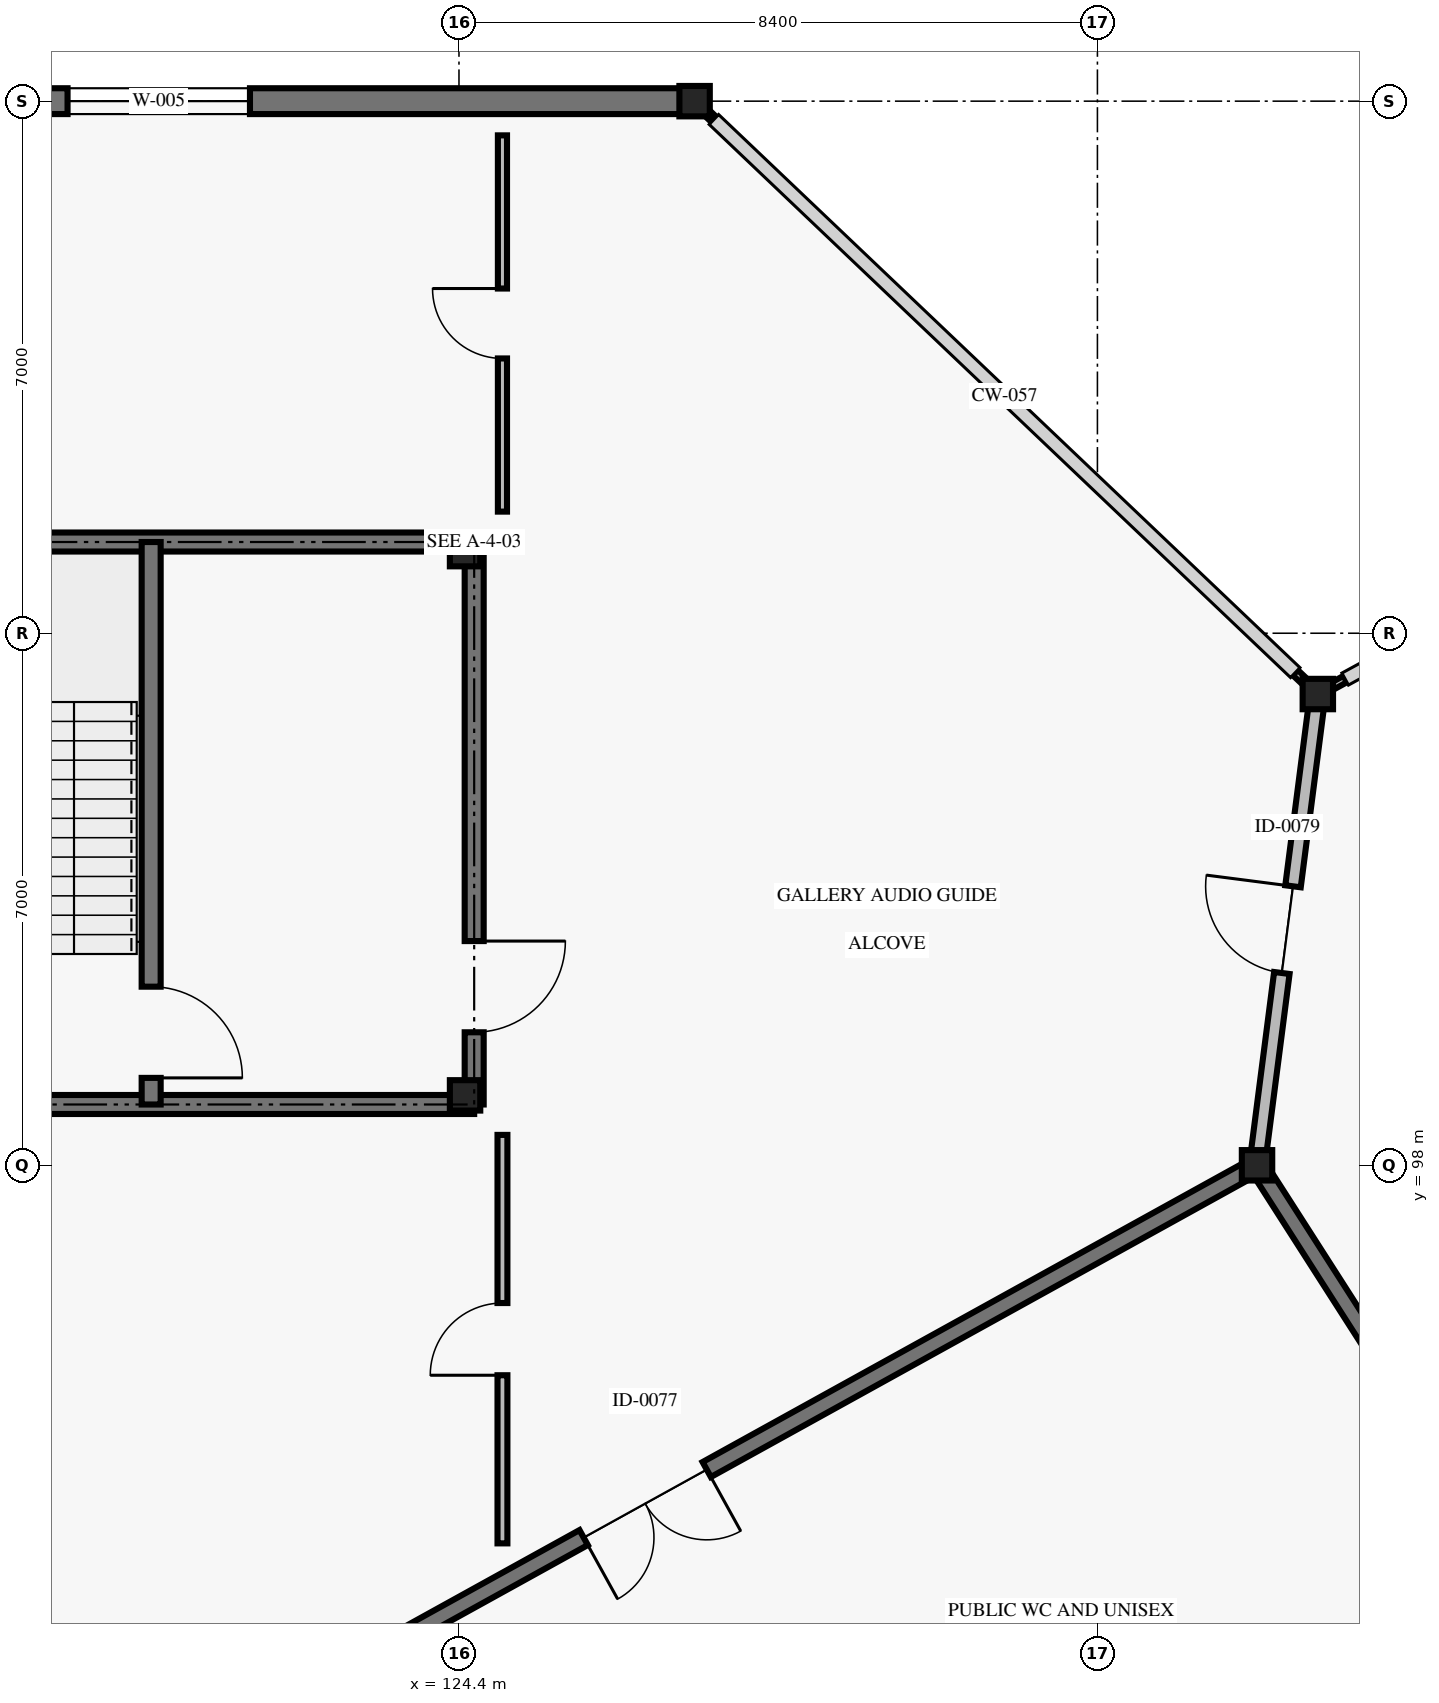
"""IFC4 building model, lengths in metres.
Left out: names, types, materials, properties, quantities, classifications, styles, units other than length and angle.
Written with IfcOpenShell. Run it as: python <this file> out.ifc"""

import sys

from ifc_helpers import new_model, si_unit, direction, frame, frame_2d, origin, origin_2d, place, context, subcontext, project, spatial, rectangle, i_section, extrude, element, fill, save


model = new_model("IFC4")
c1 = context("Model", 3, precision=1e-05, world=origin(), true_north=direction((0.0, 1.0)))
c2 = subcontext(c1, "Body", "Model", "MODEL_VIEW")
j1 = project(units=[si_unit("LENGTHUNIT", "METRE"), si_unit("PLANEANGLEUNIT", "RADIAN")], contexts=[c1])
p1 = place(None, origin())
s1 = spatial("IfcSite", under=j1, at=p1, CompositionType="ELEMENT")
p2 = place(p1, origin())
s2 = spatial("IfcBuilding", under=s1, at=p2, CompositionType="ELEMENT")
p3 = place(p2, frame((0.0, 0.0, 5.4)))
s3 = spatial("IfcBuildingStorey", under=s2, at=p3, CompositionType="ELEMENT", Elevation=5.4)
for number, where, z_axis, x_axis in (
    (1, (127.5, 112.0, 0.0), (0.0, 0.0, 1.0), (1.0, 0.0, 0.0)),
    (2, (134.9, 98.0, 0.0), (0.0, 0.0, 1.0), (1.0, 0.0, 0.0)),
    (3, (135.7, 104.2, 0.0), (0.0, 0.0, 1.0), (1.0, 0.0, 0.0)),
    (4, (124.48, 98.92, 0.0), (0.0, 0.0, 1.0), (1.0, 0.0, 0.0)),
    (5, (124.48, 106.08, 0.0), (0.0, 0.0, 1.0), (1.0, 0.0, 0.0)),
):
    element("IfcColumn", number, at=place(p3, frame(where, z_axis=z_axis, x_axis=x_axis)), inside=s3, PredefinedType="COLUMN", context=c2, shape_type="SweptSolid", body=[
        extrude(i_section(OverallWidth=0.4, OverallDepth=0.4, WebThickness=0.022, FlangeThickness=0.036, at=origin_2d()), origin(), (0.0, 0.0, 1.0), 4.8),
    ])
for number, where, z_axis, x_axis in (
    (6, (127.53, 111.971, 0.0), (0.0, 0.0, 1.0), (0.726, -0.687, 0.0)),
    (7, (135.403, 104.482, 0.0), (0.0, 0.0, 1.0), (0.726, -0.687, 0.0)),
):
    element("IfcWall", number, at=place(p3, frame(where, z_axis=z_axis, x_axis=x_axis)), inside=s3, PredefinedType="SOLIDWALL", context=c2, shape_type="SweptSolid", body=[
        extrude(rectangle(XDim=0.308, YDim=0.095, at=frame_2d((0.154, 0.0))), origin(), (0.0, 0.0, 1.0), 3.62),
    ])
p4 = place(p3, frame((113.4, 112.0, 0.0), z_axis=(0.0, 0.0, 1.0), x_axis=(1.0, 0.0, 0.0)))
e8 = element("IfcWall", 8, at=p4, inside=s3, PredefinedType="SOLIDWALL", context=c2, shape_type="SweptSolid", body=[
    extrude(rectangle(XDim=14.1, YDim=0.34, at=frame_2d((7.05, 0.0))), origin(), (0.0, 0.0, 1.0), 3.62),
])
p5 = place(p4, frame((5.85, 0.0, 0.95)))
e9 = element("IfcOpeningElement", 9, at=p5, cuts=e8, PredefinedType="OPENING", context=c2, shape_type="SweptSolid", body=[
    extrude(rectangle(XDim=2.4, YDim=1.8, at=frame_2d((1.2, 0.9))), frame((0.0, 0.18, 0.0), z_axis=(0.0, -1.0, 0.0), x_axis=(1.0, 0.0, 0.0)), (0.0, 0.0, 1.0), 0.36),
])
p6 = place(p3, frame((135.79, 104.249, 0.0), z_axis=(0.0, 0.0, 1.0), x_axis=(0.876984894636, 0.480517944077, 0.0)))
e10 = element("IfcWall", 10, at=p6, inside=s3, PredefinedType="SOLIDWALL", context=c2, shape_type="SweptSolid", body=[
    extrude(rectangle(XDim=0.308, YDim=0.095, at=frame_2d((0.154, 0.0))), origin(), (0.0, 0.0, 1.0), 3.62),
])
p7 = place(p3, frame((134.9, 98.0, 0.0), z_axis=(0.0, 0.0, 1.0), x_axis=(-0.875181353329, -0.483794996652, 0.0)))
e11 = element("IfcWall", 11, at=p7, inside=s3, PredefinedType="SOLIDWALL", context=c2, shape_type="SweptSolid", body=[
    extrude(rectangle(XDim=18.396, YDim=0.225, at=frame_2d((9.198, 0.0))), origin(), (0.0, 0.0, 1.0), 4.02),
])
p8 = place(p7, frame((8.273, 0.0, 0.0)))
e12 = element("IfcOpeningElement", 12, at=p8, cuts=e11, PredefinedType="OPENING", context=c2, shape_type="SweptSolid", body=[
    extrude(rectangle(XDim=1.85, YDim=2.4, at=frame_2d((0.925, 1.2))), frame((0.0, 0.123, 0.0), z_axis=(0.0, -1.0, 0.0), x_axis=(1.0, 0.0, 0.0)), (0.0, 0.0, 1.0), 0.245),
])
p9 = place(p3, frame((143.1, 85.2, 0.0), z_axis=(0.0, 0.0, 1.0), x_axis=(-0.539434641352, 0.842027474439, 0.0)))
e13 = element("IfcWall", 13, at=p9, inside=s3, PredefinedType="SOLIDWALL", context=c2, shape_type="SweptSolid", body=[
    extrude(rectangle(XDim=15.201, YDim=0.225, at=frame_2d((7.601, 0.0))), origin(), (0.0, 0.0, 1.0), 4.02),
])
p10 = place(p9, frame((6.501, 0.0, 0.0)))
e14 = element("IfcOpeningElement", 14, at=p10, cuts=e13, PredefinedType="OPENING", context=c2, shape_type="SweptSolid", body=[
    extrude(rectangle(XDim=2.2, YDim=2.6, at=frame_2d((1.1, 1.3))), frame((0.0, 0.123, 0.0), z_axis=(0.0, -1.0, 0.0), x_axis=(1.0, 0.0, 0.0)), (0.0, 0.0, 1.0), 0.245),
])
p11 = place(p3, frame((134.9, 98.0, 0.0), z_axis=(0.0, 0.0, 1.0), x_axis=(0.127980011854, 0.991776747341, 0.0)))
e15 = element("IfcWall", 15, at=p11, inside=s3, PredefinedType="SOLIDWALL", context=c2, shape_type="SweptSolid", body=[
    extrude(rectangle(XDim=6.251, YDim=0.205, at=frame_2d((3.126, 0.0))), origin(), (0.0, 0.0, 1.0), 3.32),
])
p12 = place(p11, frame((2.551, 0.0, 0.0)))
e16 = element("IfcOpeningElement", 16, at=p12, cuts=e15, PredefinedType="OPENING", context=c2, shape_type="SweptSolid", body=[
    extrude(rectangle(XDim=1.15, YDim=2.2, at=frame_2d((0.575, 1.1))), frame((0.0, 0.113, 0.0), z_axis=(0.0, -1.0, 0.0), x_axis=(1.0, 0.0, 0.0)), (0.0, 0.0, 1.0), 0.225),
])
p13 = place(p3, frame((124.972, 93.026, 0.0), z_axis=(0.0, 0.0, 1.0), x_axis=(0.0, 1.0, 0.0)))
e17 = element("IfcWall", 17, at=p13, inside=s3, PredefinedType="PARTITIONING", context=c2, shape_type="SweptSolid", body=[
    extrude(rectangle(XDim=5.374, YDim=0.13, at=frame_2d((2.687, 0.0))), origin(), (0.0, 0.0, 1.0), 3.32),
])
p14 = place(p13, frame((2.212, 0.0, 0.0)))
e18 = element("IfcOpeningElement", 18, at=p14, cuts=e17, PredefinedType="OPENING", context=c2, shape_type="SweptSolid", body=[
    extrude(rectangle(XDim=0.95, YDim=2.15, at=frame_2d((0.475, 1.075))), frame((0.0, 0.075, 0.0), z_axis=(0.0, -1.0, 0.0), x_axis=(1.0, 0.0, 0.0)), (0.0, 0.0, 1.0), 0.15),
])
p15 = place(p3, frame((124.972, 106.6, 0.0), z_axis=(0.0, 0.0, 1.0), x_axis=(0.0, 1.0, 0.0)))
e19 = element("IfcWall", 19, at=p15, inside=s3, PredefinedType="PARTITIONING", context=c2, shape_type="SweptSolid", body=[
    extrude(rectangle(XDim=4.95, YDim=0.12, at=frame_2d((2.475, 0.0))), origin(), (0.0, 0.0, 1.0), 3.32),
])
p16 = place(p15, frame((2.015, 0.0, 0.0)))
e20 = element("IfcOpeningElement", 20, at=p16, cuts=e19, PredefinedType="OPENING", context=c2, shape_type="SweptSolid", body=[
    extrude(rectangle(XDim=0.92, YDim=2.1, at=frame_2d((0.46, 1.05))), frame((0.0, 0.07, 0.0), z_axis=(0.0, -1.0, 0.0), x_axis=(1.0, 0.0, 0.0)), (0.0, 0.0, 1.0), 0.14),
])
for number, where, z_axis, x_axis in (
    (21, (115.4, 106.2, 0.0), (0.0, 0.0, 1.0), (1.0, 0.0, 0.0)),
    (22, (124.6, 98.8, 0.0), (0.0, 0.0, 1.0), (-1.0, 0.0, 0.0)),
):
    element("IfcWall", number, at=place(p3, frame(where, z_axis=z_axis, x_axis=x_axis)), inside=s3, PredefinedType="SHEAR", context=c2, shape_type="SweptSolid", body=[
        extrude(rectangle(XDim=9.2, YDim=0.25, at=frame_2d((4.6, 0.0))), origin(), (0.0, 0.0, 1.0), 4.56),
    ])
p17 = place(p3, frame((124.6, 106.2, 0.0), z_axis=(0.0, 0.0, 1.0), x_axis=(0.0, -1.0, 0.0)))
e23 = element("IfcWall", 23, at=p17, inside=s3, PredefinedType="SHEAR", context=c2, shape_type="SweptSolid", body=[
    extrude(rectangle(XDim=7.4, YDim=0.25, at=frame_2d((3.7, 0.0))), origin(), (0.0, 0.0, 1.0), 4.56),
])
p18 = place(p17, frame((5.25, 0.0, 0.0)))
e24 = element("IfcOpeningElement", 24, at=p18, cuts=e23, PredefinedType="OPENING", context=c2, shape_type="SweptSolid", body=[
    extrude(rectangle(XDim=1.2, YDim=2.2, at=frame_2d((0.6, 1.1))), frame((0.0, 0.135, 0.0), z_axis=(0.0, -1.0, 0.0), x_axis=(1.0, 0.0, 0.0)), (0.0, 0.0, 1.0), 0.27),
])
p19 = place(p3, frame((120.35, 106.2, 0.0), z_axis=(0.0, 0.0, 1.0), x_axis=(0.0, -1.0, 0.0)))
e25 = element("IfcWall", 25, at=p19, inside=s3, PredefinedType="SHEAR", context=c2, shape_type="SweptSolid", body=[
    extrude(rectangle(XDim=7.4, YDim=0.25, at=frame_2d((3.7, 0.0))), origin(), (0.0, 0.0, 1.0), 4.56),
])
p20 = place(p19, frame((5.85, 0.0, 0.0)))
e26 = element("IfcOpeningElement", 26, at=p20, cuts=e25, PredefinedType="OPENING", context=c2, shape_type="SweptSolid", body=[
    extrude(rectangle(XDim=1.2, YDim=2.2, at=frame_2d((0.6, 1.1))), frame((0.0, 0.135, 0.0), z_axis=(0.0, -1.0, 0.0), x_axis=(1.0, 0.0, 0.0)), (0.0, 0.0, 1.0), 0.27),
])
p21 = place(p5, origin())
e27 = element("IfcWindow", 27, at=p21, inside=s3, PartitioningType="SINGLE_PANEL", PredefinedType="WINDOW", context=c2, shape_type="SweptSolid", body=[
    extrude(rectangle(XDim=2.4, YDim=1.8, at=frame_2d((1.2, 0.9))), frame((0.0, 0.03, 0.0), z_axis=(0.0, -1.0, 0.0), x_axis=(1.0, 0.0, 0.0)), (0.0, 0.0, 1.0), 0.06),
])
fill(e9, e27)
p22 = place(p8, origin())
e28 = element("IfcDoor", 28, at=p22, inside=s3, OperationType="DOUBLE_DOOR_SINGLE_SWING", PredefinedType="DOOR", context=c2, shape_type="SweptSolid", body=[
    extrude(rectangle(XDim=1.85, YDim=2.4, at=frame_2d((0.925, 1.2))), frame((0.0, 0.025, 0.0), z_axis=(0.0, -1.0, 0.0), x_axis=(1.0, 0.0, 0.0)), (0.0, 0.0, 1.0), 0.05),
])
fill(e12, e28)
p23 = place(p12, origin())
e29 = element("IfcDoor", 29, at=p23, inside=s3, OperationType="SINGLE_SWING_RIGHT", PredefinedType="DOOR", context=c2, shape_type="SweptSolid", body=[
    extrude(rectangle(XDim=1.15, YDim=2.2, at=frame_2d((0.575, 1.1))), frame((0.0, 0.025, 0.0), z_axis=(0.0, -1.0, 0.0), x_axis=(1.0, 0.0, 0.0)), (0.0, 0.0, 1.0), 0.05),
])
fill(e16, e29)
p24 = place(p14, origin())
e30 = element("IfcDoor", 30, at=p24, inside=s3, OperationType="SINGLE_SWING_LEFT", PredefinedType="DOOR", context=c2, shape_type="SweptSolid", body=[
    extrude(rectangle(XDim=0.95, YDim=2.15, at=frame_2d((0.475, 1.075))), frame((0.0, 0.025, 0.0), z_axis=(0.0, -1.0, 0.0), x_axis=(1.0, 0.0, 0.0)), (0.0, 0.0, 1.0), 0.05),
])
fill(e18, e30)
p25 = place(p16, origin())
e31 = element("IfcDoor", 31, at=p25, inside=s3, OperationType="SINGLE_SWING_RIGHT", PredefinedType="DOOR", context=c2, shape_type="SweptSolid", body=[
    extrude(rectangle(XDim=0.92, YDim=2.1, at=frame_2d((0.46, 1.05))), frame((0.0, 0.025, 0.0), z_axis=(0.0, -1.0, 0.0), x_axis=(1.0, 0.0, 0.0)), (0.0, 0.0, 1.0), 0.05),
])
fill(e20, e31)
p26 = place(p18, origin())
e32 = element("IfcDoor", 32, at=p26, inside=s3, OperationType="SINGLE_SWING_LEFT", PredefinedType="DOOR", context=c2, shape_type="SweptSolid", body=[
    extrude(rectangle(XDim=1.2, YDim=2.2, at=frame_2d((0.6, 1.1))), frame((0.0, 0.025, 0.0), z_axis=(0.0, -1.0, 0.0), x_axis=(1.0, 0.0, 0.0)), (0.0, 0.0, 1.0), 0.05),
])
fill(e24, e32)
p27 = place(p20, origin())
e33 = element("IfcDoor", 33, at=p27, inside=s3, OperationType="SINGLE_SWING_RIGHT", PredefinedType="DOOR", context=c2, shape_type="SweptSolid", body=[
    extrude(rectangle(XDim=1.2, YDim=2.2, at=frame_2d((0.6, 1.1))), frame((0.0, 0.025, 0.0), z_axis=(0.0, -1.0, 0.0), x_axis=(1.0, 0.0, 0.0)), (0.0, 0.0, 1.0), 0.05),
])
fill(e26, e33)
save(model, sys.argv[1])
